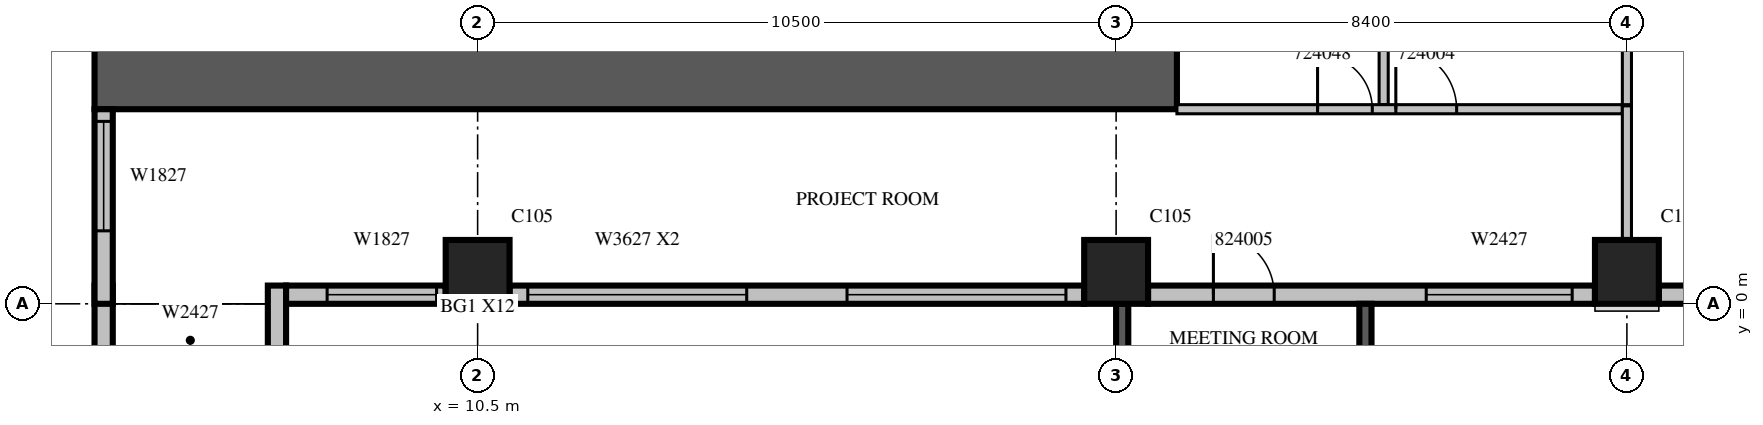
"""IFC4 building model, lengths in metres.
Left out: names, types, materials, properties, quantities, classifications, styles, units other than length and angle.
Written with IfcOpenShell. Run it as: python <this file> out.ifc"""

import sys

from ifc_helpers import new_model, si_unit, direction, frame, frame_2d, origin, origin_2d, place, context, subcontext, project, spatial, rectangle, extrude, source, transform, mapped, element, fill, save


model = new_model("IFC4")
c1 = context("Model", 3, precision=1e-05, world=origin(), true_north=direction((0.0, 1.0)))
c2 = subcontext(c1, "Body", "Model", "MODEL_VIEW")
j1 = project(units=[si_unit("LENGTHUNIT", "METRE"), si_unit("PLANEANGLEUNIT", "RADIAN")], contexts=[c1])
p1 = place(None, origin())
s1 = spatial("IfcSite", under=j1, at=p1, CompositionType="ELEMENT")
p2 = place(p1, origin())
s2 = spatial("IfcBuilding", under=s1, at=p2, CompositionType="ELEMENT")
p3 = place(p2, frame((0.0, 0.0, 111.9)))
s3 = spatial("IfcBuildingStorey", under=s2, at=p3, CompositionType="ELEMENT", Elevation=111.9)
m1 = source(origin(), c2, "Body", "SweptSolid", [
    extrude(rectangle(XDim=1.05, YDim=1.05, at=origin_2d()), origin(), (0.0, 0.0, 1.0), 4.2),
])
for number, where, z_axis, x_axis in (
    (1, (10.5, 0.525, 0.0), (0.0, 0.0, 1.0), (1.0, 0.0, 0.0)),
    (2, (21.0, 0.525, 0.0), (0.0, 0.0, 1.0), (1.0, 0.0, 0.0)),
    (3, (29.4, 0.525, 0.0), (0.0, 0.0, 1.0), (1.0, 0.0, 0.0)),
):
    element("IfcColumn", number, at=place(p3, frame(where, z_axis=z_axis, x_axis=x_axis)), inside=s3, PredefinedType="COLUMN", context=c2, shape_type="MappedRepresentation", body=[
        mapped(m1, transform((0.0, 0.0, 0.0), scale=1.0)),
    ])
m2 = source(origin(), c2, "Body", "SweptSolid", [
    extrude(rectangle(XDim=17.8, YDim=1.0, at=frame_2d((8.9, 0.0))), origin(), (0.0, 0.0, 1.0), 4.2),
])
p4 = place(p3, frame((4.2, 3.7, 0.0), z_axis=(0.0, 0.0, 1.0), x_axis=(1.0, 0.0, 0.0)))
e4 = element("IfcWall", 4, at=p4, inside=s3, PredefinedType="SHEAR", context=c2, shape_type="MappedRepresentation", body=[
    mapped(m2, transform((0.0, 0.0, 0.0), scale=1.0)),
])
m3 = source(origin(), c2, "Body", "SweptSolid", [
    extrude(rectangle(XDim=1.2, YDim=0.3, at=frame_2d((0.6, 0.0))), origin(), (0.0, 0.0, 1.0), 3.8),
])
for number, where, z_axis, x_axis in (
    (5, (4.35, 0.3, 0.0), (0.0, 0.0, 1.0), (0.0, -1.0, 0.0)),
    (6, (7.2, 0.3, 0.0), (0.0, 0.0, 1.0), (0.0, -1.0, 0.0)),
):
    element("IfcWall", number, at=place(p3, frame(where, z_axis=z_axis, x_axis=x_axis)), inside=s3, PredefinedType="STANDARD", context=c2, shape_type="MappedRepresentation", body=[
        mapped(m3, transform((0.0, 0.0, 0.0), scale=1.0)),
    ])
m4 = source(origin(), c2, "Body", "SweptSolid", [
    extrude(rectangle(XDim=2.625, YDim=0.3, at=frame_2d((1.312, 0.0))), origin(), (0.0, 0.0, 1.0), 3.8),
])
p5 = place(p3, frame((7.35, 0.15, 0.0), z_axis=(0.0, 0.0, 1.0), x_axis=(1.0, 0.0, 0.0)))
e7 = element("IfcWall", 7, at=p5, inside=s3, PredefinedType="STANDARD", context=c2, shape_type="MappedRepresentation", body=[
    mapped(m4, transform((0.0, 0.0, 0.0), scale=1.0)),
])
m5 = source(origin(), c2, "Body", "SweptSolid", [
    extrude(rectangle(XDim=1.8, YDim=2.7, at=frame_2d((0.9, 1.35))), frame((0.0, 0.16, 0.0), z_axis=(0.0, -1.0, 0.0), x_axis=(1.0, 0.0, 0.0)), (0.0, 0.0, 1.0), 0.32),
])
p6 = place(p5, frame((0.675, 0.0, 0.6)))
e8 = element("IfcOpeningElement", 8, at=p6, cuts=e7, PredefinedType="OPENING", context=c2, shape_type="MappedRepresentation", body=[
    mapped(m5, transform((0.0, 0.0, 0.0), scale=1.0)),
])
m6 = source(origin(), c2, "Body", "SweptSolid", [
    extrude(rectangle(XDim=9.45, YDim=0.3, at=frame_2d((4.725, 0.0))), origin(), (0.0, 0.0, 1.0), 3.8),
])
p7 = place(p3, frame((11.025, 0.15, 0.0), z_axis=(0.0, 0.0, 1.0), x_axis=(1.0, 0.0, 0.0)))
e9 = element("IfcWall", 9, at=p7, inside=s3, PredefinedType="STANDARD", context=c2, shape_type="MappedRepresentation", body=[
    mapped(m6, transform((0.0, 0.0, 0.0), scale=1.0)),
])
m7 = source(origin(), c2, "Body", "SweptSolid", [
    extrude(rectangle(XDim=3.6, YDim=2.7, at=frame_2d((1.8, 1.35))), frame((0.0, 0.16, 0.0), z_axis=(0.0, -1.0, 0.0), x_axis=(1.0, 0.0, 0.0)), (0.0, 0.0, 1.0), 0.32),
])
p8 = place(p7, frame((0.3, 0.0, 0.6)))
e10 = element("IfcOpeningElement", 10, at=p8, cuts=e9, PredefinedType="OPENING", context=c2, shape_type="MappedRepresentation", body=[
    mapped(m7, transform((0.0, 0.0, 0.0), scale=1.0)),
])
p9 = place(p7, frame((5.55, 0.0, 0.6)))
e11 = element("IfcOpeningElement", 11, at=p9, cuts=e9, PredefinedType="OPENING", context=c2, shape_type="MappedRepresentation", body=[
    mapped(m7, transform((0.0, 0.0, 0.0), scale=1.0)),
])
m8 = source(origin(), c2, "Body", "SweptSolid", [
    extrude(rectangle(XDim=7.35, YDim=0.3, at=frame_2d((3.675, 0.0))), origin(), (0.0, 0.0, 1.0), 3.8),
])
p10 = place(p3, frame((21.525, 0.15, 0.0), z_axis=(0.0, 0.0, 1.0), x_axis=(1.0, 0.0, 0.0)))
e12 = element("IfcWall", 12, at=p10, inside=s3, PredefinedType="STANDARD", context=c2, shape_type="MappedRepresentation", body=[
    mapped(m8, transform((0.0, 0.0, 0.0), scale=1.0)),
])
m9 = source(origin(), c2, "Body", "SweptSolid", [
    extrude(rectangle(XDim=2.4, YDim=2.7, at=frame_2d((1.2, 1.35))), frame((0.0, 0.16, 0.0), z_axis=(0.0, -1.0, 0.0), x_axis=(1.0, 0.0, 0.0)), (0.0, 0.0, 1.0), 0.32),
])
p11 = place(p10, frame((4.575, 0.0, 0.6)))
e13 = element("IfcOpeningElement", 13, at=p11, cuts=e12, PredefinedType="OPENING", context=c2, shape_type="MappedRepresentation", body=[
    mapped(m9, transform((0.0, 0.0, 0.0), scale=1.0)),
])
m10 = source(origin(), c2, "Body", "SweptSolid", [
    extrude(rectangle(XDim=1.0, YDim=2.1, at=frame_2d((0.5, 1.05))), frame((0.0, 0.16, 0.0), z_axis=(0.0, -1.0, 0.0), x_axis=(1.0, 0.0, 0.0)), (0.0, 0.0, 1.0), 0.32),
])
p12 = place(p10, frame((1.075, 0.0, 0.0)))
e14 = element("IfcOpeningElement", 14, at=p12, cuts=e12, PredefinedType="OPENING", context=c2, shape_type="MappedRepresentation", body=[
    mapped(m10, transform((0.0, 0.0, 0.0), scale=1.0)),
])
p13 = place(p3, frame((29.925, 0.15, 0.0), z_axis=(0.0, 0.0, 1.0), x_axis=(1.0, 0.0, 0.0)))
e15 = element("IfcWall", 15, at=p13, inside=s3, PredefinedType="STANDARD", context=c2, shape_type="MappedRepresentation", body=[
    mapped(m8, transform((0.0, 0.0, 0.0), scale=1.0)),
])
m11 = source(origin(), c2, "Body", "SweptSolid", [
    extrude(rectangle(XDim=3.2, YDim=0.3, at=frame_2d((1.6, 0.0))), origin(), (0.0, 0.0, 1.0), 3.8),
])
p14 = place(p3, frame((4.35, 3.2, 0.0), z_axis=(0.0, 0.0, 1.0), x_axis=(0.0, -1.0, 0.0)))
e16 = element("IfcWall", 16, at=p14, inside=s3, PredefinedType="STANDARD", context=c2, shape_type="MappedRepresentation", body=[
    mapped(m11, transform((0.0, 0.0, 0.0), scale=1.0)),
])
p15 = place(p14, frame((0.2, 0.0, 0.6)))
e17 = element("IfcOpeningElement", 17, at=p15, cuts=e16, PredefinedType="OPENING", context=c2, shape_type="MappedRepresentation", body=[
    mapped(m5, transform((0.0, 0.0, 0.0), scale=1.0)),
])
m12 = source(origin(), c2, "Body", "SweptSolid", [
    extrude(rectangle(XDim=3.9, YDim=0.2, at=frame_2d((1.95, 0.0))), origin(), (0.0, 0.0, 1.0), 3.79),
])
p16 = place(p3, frame((21.1, 0.0, 0.0), z_axis=(0.0, 0.0, 1.0), x_axis=(0.0, -1.0, 0.0)))
e18 = element("IfcWall", 18, at=p16, inside=s3, PredefinedType="SOLIDWALL", context=c2, shape_type="MappedRepresentation", body=[
    mapped(m12, transform((0.0, 0.0, 0.0), scale=1.0)),
])
m13 = source(origin(), c2, "Body", "SweptSolid", [
    extrude(rectangle(XDim=2.4, YDim=2.7, at=frame_2d((1.2, 1.35))), frame((0.0, 0.11, 0.0), z_axis=(0.0, -1.0, 0.0), x_axis=(1.0, 0.0, 0.0)), (0.0, 0.0, 1.0), 0.22),
])
p17 = place(p16, frame((0.75, 0.0, 0.6)))
e19 = element("IfcOpeningElement", 19, at=p17, cuts=e18, PredefinedType="OPENING", context=c2, shape_type="MappedRepresentation", body=[
    mapped(m13, transform((0.0, 0.0, 0.0), scale=1.0)),
])
p18 = place(p3, frame((25.1, 0.0, 0.0), z_axis=(0.0, 0.0, 1.0), x_axis=(0.0, -1.0, 0.0)))
e20 = element("IfcWall", 20, at=p18, inside=s3, PredefinedType="SOLIDWALL", context=c2, shape_type="MappedRepresentation", body=[
    mapped(m12, transform((0.0, 0.0, 0.0), scale=1.0)),
])
p19 = place(p18, frame((0.75, 0.0, 0.6)))
e21 = element("IfcOpeningElement", 21, at=p19, cuts=e20, PredefinedType="OPENING", context=c2, shape_type="MappedRepresentation", body=[
    mapped(m13, transform((0.0, 0.0, 0.0), scale=1.0)),
])
p20 = place(p3, frame((25.4, 14.7, 0.0), z_axis=(0.0, 0.0, 1.0), x_axis=(0.0, -1.0, 0.0)))
e22 = element("IfcWall", 22, at=p20, inside=s3, PredefinedType="PARTITIONING", context=c2, shape_type="SweptSolid", body=[
    extrude(rectangle(XDim=11.425, YDim=0.15, at=frame_2d((5.713, 0.0))), origin(), (0.0, 0.0, 1.0), 3.8),
])
m14 = source(origin(), c2, "Body", "SweptSolid", [
    extrude(rectangle(XDim=0.9, YDim=2.1, at=frame_2d((0.45, 1.05))), frame((0.0, 0.085, 0.0), z_axis=(0.0, -1.0, 0.0), x_axis=(1.0, 0.0, 0.0)), (0.0, 0.0, 1.0), 0.17),
])
p21 = place(p20, frame((6.763, 0.0, 0.0)))
e23 = element("IfcOpeningElement", 23, at=p21, cuts=e22, PredefinedType="OPENING", context=c2, shape_type="MappedRepresentation", body=[
    mapped(m14, transform((0.0, 0.0, 0.0), scale=1.0)),
])
p22 = place(p20, frame((0.175, 0.0, 0.0)))
e24 = element("IfcOpeningElement", 24, at=p22, cuts=e22, PredefinedType="OPENING", context=c2, shape_type="MappedRepresentation", body=[
    mapped(m14, transform((0.0, 0.0, 0.0), scale=1.0)),
])
m15 = source(origin(), c2, "Body", "SweptSolid", [
    extrude(rectangle(XDim=6.701, YDim=0.15, at=frame_2d((3.35, 0.0))), origin(), (0.0, 0.0, 1.0), 3.8),
])
p23 = place(p3, frame((29.4, 3.275, 0.0), z_axis=(0.0, 0.0, 1.0), x_axis=(0.0, 1.0, 0.0)))
e25 = element("IfcWall", 25, at=p23, inside=s3, PredefinedType="PARTITIONING", context=c2, shape_type="MappedRepresentation", body=[
    mapped(m15, transform((0.0, 0.0, 0.0), scale=1.0)),
])
p24 = place(p3, frame((22.0, 3.2, 0.0), z_axis=(0.0, 0.0, 1.0), x_axis=(1.0, 0.0, 0.0)))
e26 = element("IfcWall", 26, at=p24, inside=s3, PredefinedType="PARTITIONING", context=c2, shape_type="SweptSolid", body=[
    extrude(rectangle(XDim=7.325, YDim=0.15, at=frame_2d((3.663, 0.0))), origin(), (0.0, 0.0, 1.0), 3.8),
])
m16 = source(origin(), c2, "Body", "SweptSolid", [
    extrude(rectangle(XDim=1.0, YDim=2.1, at=frame_2d((0.5, 1.05))), frame((0.0, 0.085, 0.0), z_axis=(0.0, -1.0, 0.0), x_axis=(1.0, 0.0, 0.0)), (0.0, 0.0, 1.0), 0.17),
])
p25 = place(p24, frame((3.6, 0.0, 0.0)))
e27 = element("IfcOpeningElement", 27, at=p25, cuts=e26, PredefinedType="OPENING", context=c2, shape_type="MappedRepresentation", body=[
    mapped(m16, transform((0.0, 0.0, 0.0), scale=1.0)),
])
p26 = place(p24, frame((2.313, 0.0, 0.0)))
e28 = element("IfcOpeningElement", 28, at=p26, cuts=e26, PredefinedType="OPENING", context=c2, shape_type="MappedRepresentation", body=[
    mapped(m14, transform((0.0, 0.0, 0.0), scale=1.0)),
])
m17 = source(origin(), c2, "Body", "SweptSolid", [
    extrude(rectangle(XDim=2.206, YDim=0.15, at=frame_2d((1.103, 0.0))), origin(), (0.0, 0.0, 1.0), 3.8),
])
p27 = place(p3, frame((29.4, 1.049, 0.0), z_axis=(0.0, 0.0, 1.0), x_axis=(0.0, 1.0, 0.0)))
e29 = element("IfcWall", 29, at=p27, inside=s3, PredefinedType="PARTITIONING", context=c2, shape_type="MappedRepresentation", body=[
    mapped(m17, transform((0.0, 0.0, 0.0), scale=1.0)),
])
m18 = source(origin(), c2, "Body", "SweptSolid", [
    extrude(rectangle(XDim=1.8, YDim=2.7, at=frame_2d((0.9, 1.35))), frame((0.0, 0.03, 0.0), z_axis=(0.0, -1.0, 0.0), x_axis=(1.0, 0.0, 0.0)), (0.0, 0.0, 1.0), 0.06),
])
p28 = place(p6, origin())
e30 = element("IfcWindow", 30, at=p28, inside=s3, PartitioningType="SINGLE_PANEL", PredefinedType="WINDOW", context=c2, shape_type="MappedRepresentation", body=[
    mapped(m18, transform((0.0, 0.0, 0.0), scale=1.0)),
])
fill(e8, e30)
m19 = source(origin(), c2, "Body", "SweptSolid", [
    extrude(rectangle(XDim=3.6, YDim=2.7, at=frame_2d((1.8, 1.35))), frame((0.0, 0.03, 0.0), z_axis=(0.0, -1.0, 0.0), x_axis=(1.0, 0.0, 0.0)), (0.0, 0.0, 1.0), 0.06),
])
p29 = place(p8, origin())
e31 = element("IfcWindow", 31, at=p29, inside=s3, PartitioningType="SINGLE_PANEL", PredefinedType="WINDOW", context=c2, shape_type="MappedRepresentation", body=[
    mapped(m19, transform((0.0, 0.0, 0.0), scale=1.0)),
])
fill(e10, e31)
p30 = place(p9, origin())
e32 = element("IfcWindow", 32, at=p30, inside=s3, PartitioningType="SINGLE_PANEL", PredefinedType="WINDOW", context=c2, shape_type="MappedRepresentation", body=[
    mapped(m19, transform((0.0, 0.0, 0.0), scale=1.0)),
])
fill(e11, e32)
m20 = source(origin(), c2, "Body", "SweptSolid", [
    extrude(rectangle(XDim=2.4, YDim=2.7, at=frame_2d((1.2, 1.35))), frame((0.0, 0.03, 0.0), z_axis=(0.0, -1.0, 0.0), x_axis=(1.0, 0.0, 0.0)), (0.0, 0.0, 1.0), 0.06),
])
p31 = place(p11, origin())
e33 = element("IfcWindow", 33, at=p31, inside=s3, PartitioningType="SINGLE_PANEL", PredefinedType="WINDOW", context=c2, shape_type="MappedRepresentation", body=[
    mapped(m20, transform((0.0, 0.0, 0.0), scale=1.0)),
])
fill(e13, e33)
p32 = place(p15, origin())
e34 = element("IfcWindow", 34, at=p32, inside=s3, PartitioningType="SINGLE_PANEL", PredefinedType="WINDOW", context=c2, shape_type="MappedRepresentation", body=[
    mapped(m18, transform((0.0, 0.0, 0.0), scale=1.0)),
])
fill(e17, e34)
m21 = source(origin(), c2, "Body", "SweptSolid", [
    extrude(rectangle(XDim=1.0, YDim=2.1, at=frame_2d((0.5, 1.05))), frame((0.0, 0.025, 0.0), z_axis=(0.0, -1.0, 0.0), x_axis=(1.0, 0.0, 0.0)), (0.0, 0.0, 1.0), 0.05),
])
p33 = place(p25, origin())
e35 = element("IfcDoor", 35, at=p33, inside=s3, OperationType="SINGLE_SWING_LEFT", PredefinedType="DOOR", context=c2, shape_type="MappedRepresentation", body=[
    mapped(m21, transform((0.0, 0.0, 0.0), scale=1.0)),
])
fill(e27, e35)
m22 = source(origin(), c2, "Body", "SweptSolid", [
    extrude(rectangle(XDim=0.9, YDim=2.1, at=frame_2d((0.45, 1.05))), frame((0.0, 0.025, 0.0), z_axis=(0.0, -1.0, 0.0), x_axis=(1.0, 0.0, 0.0)), (0.0, 0.0, 1.0), 0.05),
])
p34 = place(p26, origin())
e36 = element("IfcDoor", 36, at=p34, inside=s3, OperationType="SINGLE_SWING_LEFT", PredefinedType="DOOR", context=c2, shape_type="MappedRepresentation", body=[
    mapped(m22, transform((0.0, 0.0, 0.0), scale=1.0)),
])
fill(e28, e36)
p35 = place(p12, origin())
e37 = element("IfcDoor", 37, at=p35, inside=s3, OperationType="SINGLE_SWING_LEFT", PredefinedType="DOOR", context=c2, shape_type="MappedRepresentation", body=[
    mapped(m21, transform((0.0, 0.0, 0.0), scale=1.0)),
])
fill(e14, e37)
save(model, sys.argv[1])
